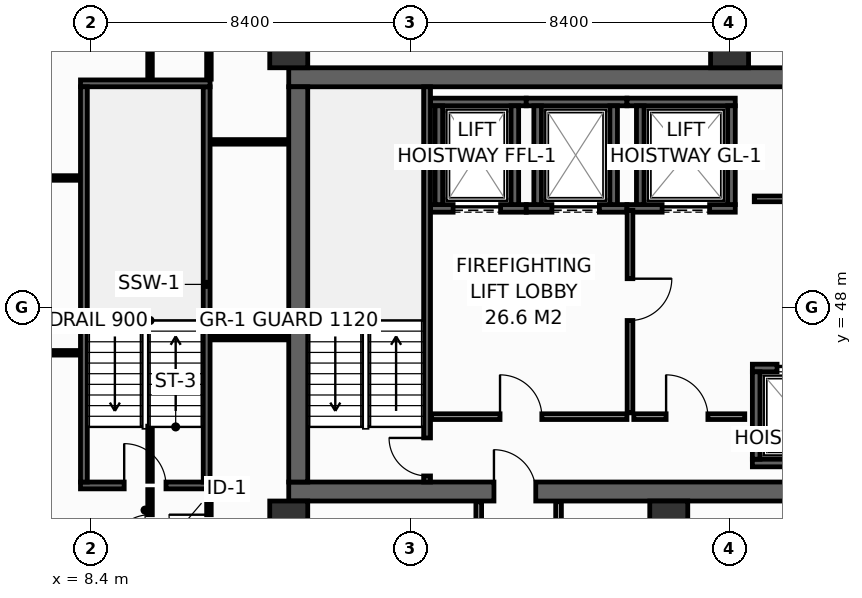
"""IFC4 building model, lengths in metres.
Left out: names, types, materials, properties, quantities, classifications, styles, units other than length and angle.
Written with IfcOpenShell. Run it as: python <this file> out.ifc"""

import sys

from ifc_helpers import new_model, si_unit, direction, frame, frame_2d, origin, origin_2d, place, context, subcontext, project, spatial, rectangle, hollow_rectangle, extrude, element, fill, save


model = new_model("IFC4")
c1 = context("Model", 3, precision=1e-05, world=origin(), true_north=direction((0.0, 1.0)))
c2 = subcontext(c1, "Body", "Model", "MODEL_VIEW")
j1 = project(units=[si_unit("LENGTHUNIT", "METRE"), si_unit("PLANEANGLEUNIT", "RADIAN")], contexts=[c1])
p1 = place(None, origin())
s1 = spatial("IfcSite", under=j1, at=p1, CompositionType="ELEMENT")
p2 = place(p1, origin())
s2 = spatial("IfcBuilding", under=s1, at=p2, CompositionType="ELEMENT")
p3 = place(p2, frame((0.0, 0.0, 129.6)))
s3 = spatial("IfcBuildingStorey", under=s2, at=p3, CompositionType="ELEMENT", Elevation=129.6)
p4 = place(p3, frame((13.6, 43.15, 0.0), z_axis=(0.0, 0.0, 1.0), x_axis=(1.0, 0.0, 0.0)))
e1 = element("IfcWall", 1, at=p4, inside=s3, PredefinedType="SHEAR", context=c2, shape_type="SweptSolid", body=[
    extrude(rectangle(XDim=32.7, YDim=0.5, at=frame_2d((16.35, 0.0))), origin(), (0.0, 0.0, 1.0), 3.55),
])
p5 = place(p4, frame((5.4, 0.0, 0.0)))
e2 = element("IfcOpeningElement", 2, at=p5, cuts=e1, PredefinedType="OPENING", context=c2, shape_type="SweptSolid", body=[
    extrude(rectangle(XDim=1.1, YDim=2.15, at=frame_2d((0.55, 1.075))), frame((0.0, 0.26, 0.0), z_axis=(0.0, -1.0, 0.0), x_axis=(1.0, 0.0, 0.0)), (0.0, 0.0, 1.0), 0.52),
])
p6 = place(p4, frame((25.6, 0.0, 0.0)))
e3 = element("IfcOpeningElement", 3, at=p6, cuts=e1, PredefinedType="OPENING", context=c2, shape_type="SweptSolid", body=[
    extrude(rectangle(XDim=1.1, YDim=2.15, at=frame_2d((0.55, 1.075))), frame((0.0, 0.26, 0.0), z_axis=(0.0, -1.0, 0.0), x_axis=(1.0, 0.0, 0.0)), (0.0, 0.0, 1.0), 0.52),
])
p7 = place(p3, frame((13.6, 54.05, 0.0), z_axis=(0.0, 0.0, 1.0), x_axis=(1.0, 0.0, 0.0)))
e4 = element("IfcWall", 4, at=p7, inside=s3, PredefinedType="SHEAR", context=c2, shape_type="SweptSolid", body=[
    extrude(rectangle(XDim=32.7, YDim=0.5, at=frame_2d((16.35, 0.0))), origin(), (0.0, 0.0, 1.0), 3.55),
])
p8 = place(p3, frame((13.85, 43.4, 0.0), z_axis=(0.0, 0.0, 1.0), x_axis=(0.0, 1.0, 0.0)))
e5 = element("IfcWall", 5, at=p8, inside=s3, PredefinedType="SHEAR", context=c2, shape_type="SweptSolid", body=[
    extrude(rectangle(XDim=10.4, YDim=0.5, at=frame_2d((5.2, 0.0))), origin(), (0.0, 0.0, 1.0), 3.55),
])
for number, where, z_axis, x_axis in (
    (6, (13.6, 54.8, 0.0), (0.0, 0.0, 1.0), (1.0, 0.0, 0.0)),
    (7, (25.2, 54.8, 0.0), (0.0, 0.0, 1.0), (1.0, 0.0, 0.0)),
    (8, (13.6, 42.4, 0.0), (0.0, 0.0, 1.0), (1.0, 0.0, 0.0)),
    (9, (23.6, 42.4, 0.0), (0.0, 0.0, 1.0), (1.0, 0.0, 0.0)),
):
    element("IfcColumn", number, at=place(p3, frame(where, z_axis=z_axis, x_axis=x_axis)), inside=s3, PredefinedType="COLUMN", context=c2, shape_type="SweptSolid", body=[
        extrude(hollow_rectangle(XDim=1.0, YDim=1.0, WallThickness=0.045, at=origin_2d()), origin(), (0.0, 0.0, 1.0), 3.8),
    ])
p9 = place(p3, frame((17.33, 50.6, 0.0), z_axis=(0.0, 0.0, 1.0), x_axis=(1.0, 0.0, 0.0)))
e10 = element("IfcWall", 10, at=p9, inside=s3, PredefinedType="SHEAR", context=c2, shape_type="SweptSolid", body=[
    extrude(rectangle(XDim=2.52, YDim=0.2, at=frame_2d((1.26, 0.0))), origin(), (0.0, 0.0, 1.0), 3.55),
])
p10 = place(p9, frame((0.595, 0.0, 0.0)))
e11 = element("IfcOpeningElement", 11, at=p10, cuts=e10, PredefinedType="OPENING", context=c2, shape_type="SweptSolid", body=[
    extrude(rectangle(XDim=1.25, YDim=2.3, at=frame_2d((0.625, 1.15))), frame((0.0, 0.11, 0.0), z_axis=(0.0, -1.0, 0.0), x_axis=(1.0, 0.0, 0.0)), (0.0, 0.0, 1.0), 0.22),
])
p11 = place(p3, frame((17.33, 53.4, 0.0), z_axis=(0.0, 0.0, 1.0), x_axis=(1.0, 0.0, 0.0)))
e12 = element("IfcWall", 12, at=p11, inside=s3, PredefinedType="SHEAR", context=c2, shape_type="SweptSolid", body=[
    extrude(rectangle(XDim=2.52, YDim=0.2, at=frame_2d((1.26, 0.0))), origin(), (0.0, 0.0, 1.0), 3.55),
])
for number, where, z_axis, x_axis in (
    (13, (17.55, 50.7, 0.0), (0.0, 0.0, 1.0), (0.0, 1.0, 0.0)),
    (14, (19.55, 50.7, 0.0), (0.0, 0.0, 1.0), (0.0, 1.0, 0.0)),
):
    element("IfcWall", number, at=place(p3, frame(where, z_axis=z_axis, x_axis=x_axis)), inside=s3, PredefinedType="SHEAR", context=c2, shape_type="SweptSolid", body=[
        extrude(rectangle(XDim=2.6, YDim=0.2, at=frame_2d((1.3, 0.0))), origin(), (0.0, 0.0, 1.0), 3.55),
    ])
p12 = place(p3, frame((19.85, 50.6, 0.0), z_axis=(0.0, 0.0, 1.0), x_axis=(1.0, 0.0, 0.0)))
e15 = element("IfcWall", 15, at=p12, inside=s3, PredefinedType="SHEAR", context=c2, shape_type="SweptSolid", body=[
    extrude(rectangle(XDim=2.65, YDim=0.2, at=frame_2d((1.325, 0.0))), origin(), (0.0, 0.0, 1.0), 3.55),
])
p13 = place(p12, frame((0.675, 0.0, 0.0)))
e16 = element("IfcOpeningElement", 16, at=p13, cuts=e15, PredefinedType="OPENING", context=c2, shape_type="SweptSolid", body=[
    extrude(rectangle(XDim=1.25, YDim=2.3, at=frame_2d((0.625, 1.15))), frame((0.0, 0.11, 0.0), z_axis=(0.0, -1.0, 0.0), x_axis=(1.0, 0.0, 0.0)), (0.0, 0.0, 1.0), 0.22),
])
p14 = place(p3, frame((19.85, 53.4, 0.0), z_axis=(0.0, 0.0, 1.0), x_axis=(1.0, 0.0, 0.0)))
e17 = element("IfcWall", 17, at=p14, inside=s3, PredefinedType="SHEAR", context=c2, shape_type="SweptSolid", body=[
    extrude(rectangle(XDim=2.65, YDim=0.2, at=frame_2d((1.325, 0.0))), origin(), (0.0, 0.0, 1.0), 3.55),
])
for number, where, z_axis, x_axis in (
    (18, (20.15, 50.7, 0.0), (0.0, 0.0, 1.0), (0.0, 1.0, 0.0)),
    (19, (22.15, 50.7, 0.0), (0.0, 0.0, 1.0), (0.0, 1.0, 0.0)),
):
    element("IfcWall", number, at=place(p3, frame(where, z_axis=z_axis, x_axis=x_axis)), inside=s3, PredefinedType="SHEAR", context=c2, shape_type="SweptSolid", body=[
        extrude(rectangle(XDim=2.6, YDim=0.2, at=frame_2d((1.3, 0.0))), origin(), (0.0, 0.0, 1.0), 3.55),
    ])
p15 = place(p3, frame((22.5, 50.6, 0.0), z_axis=(0.0, 0.0, 1.0), x_axis=(1.0, 0.0, 0.0)))
e20 = element("IfcWall", 20, at=p15, inside=s3, PredefinedType="SHEAR", context=c2, shape_type="SweptSolid", body=[
    extrude(rectangle(XDim=2.85, YDim=0.2, at=frame_2d((1.425, 0.0))), origin(), (0.0, 0.0, 1.0), 3.55),
])
p16 = place(p15, frame((0.925, 0.0, 0.0)))
e21 = element("IfcOpeningElement", 21, at=p16, cuts=e20, PredefinedType="OPENING", context=c2, shape_type="SweptSolid", body=[
    extrude(rectangle(XDim=1.25, YDim=2.3, at=frame_2d((0.625, 1.15))), frame((0.0, 0.11, 0.0), z_axis=(0.0, -1.0, 0.0), x_axis=(1.0, 0.0, 0.0)), (0.0, 0.0, 1.0), 0.22),
])
p17 = place(p3, frame((22.5, 53.4, 0.0), z_axis=(0.0, 0.0, 1.0), x_axis=(1.0, 0.0, 0.0)))
e22 = element("IfcWall", 22, at=p17, inside=s3, PredefinedType="SHEAR", context=c2, shape_type="SweptSolid", body=[
    extrude(rectangle(XDim=2.85, YDim=0.2, at=frame_2d((1.425, 0.0))), origin(), (0.0, 0.0, 1.0), 3.55),
])
for number, where, z_axis, x_axis in (
    (23, (22.85, 50.7, 0.0), (0.0, 0.0, 1.0), (0.0, 1.0, 0.0)),
    (24, (25.25, 50.7, 0.0), (0.0, 0.0, 1.0), (0.0, 1.0, 0.0)),
):
    element("IfcWall", number, at=place(p3, frame(where, z_axis=z_axis, x_axis=x_axis)), inside=s3, PredefinedType="SHEAR", context=c2, shape_type="SweptSolid", body=[
        extrude(rectangle(XDim=2.6, YDim=0.2, at=frame_2d((1.3, 0.0))), origin(), (0.0, 0.0, 1.0), 3.55),
    ])
p18 = place(p3, frame((25.8, 43.9, 0.0), z_axis=(0.0, 0.0, 1.0), x_axis=(1.0, 0.0, 0.0)))
e25 = element("IfcWall", 25, at=p18, inside=s3, PredefinedType="SHEAR", context=c2, shape_type="SweptSolid", body=[
    extrude(rectangle(XDim=2.575, YDim=0.2, at=frame_2d((1.288, 0.0))), origin(), (0.0, 0.0, 1.0), 3.55),
])
p19 = place(p3, frame((25.8, 46.4, 0.0), z_axis=(0.0, 0.0, 1.0), x_axis=(1.0, 0.0, 0.0)))
e26 = element("IfcWall", 26, at=p19, inside=s3, PredefinedType="SHEAR", context=c2, shape_type="SweptSolid", body=[
    extrude(rectangle(XDim=2.575, YDim=0.2, at=frame_2d((1.288, 0.0))), origin(), (0.0, 0.0, 1.0), 3.55),
])
p20 = place(p19, frame((0.65, 0.0, 0.0)))
e27 = element("IfcOpeningElement", 27, at=p20, cuts=e26, PredefinedType="OPENING", context=c2, shape_type="SweptSolid", body=[
    extrude(rectangle(XDim=1.1, YDim=2.2, at=frame_2d((0.55, 1.1))), frame((0.0, 0.11, 0.0), z_axis=(0.0, -1.0, 0.0), x_axis=(1.0, 0.0, 0.0)), (0.0, 0.0, 1.0), 0.22),
])
p21 = place(p3, frame((25.9, 44.0, 0.0), z_axis=(0.0, 0.0, 1.0), x_axis=(0.0, 1.0, 0.0)))
e28 = element("IfcWall", 28, at=p21, inside=s3, PredefinedType="SHEAR", context=c2, shape_type="SweptSolid", body=[
    extrude(rectangle(XDim=2.3, YDim=0.2, at=frame_2d((1.15, 0.0))), origin(), (0.0, 0.0, 1.0), 3.55),
])
p22 = place(p3, frame((17.24, 43.4, 0.0), z_axis=(0.0, 0.0, 1.0), x_axis=(0.0, 1.0, 0.0)))
e29 = element("IfcWall", 29, at=p22, inside=s3, PredefinedType="SHEAR", context=c2, shape_type="SweptSolid", body=[
    extrude(rectangle(XDim=10.4, YDim=0.18, at=frame_2d((5.2, 0.0))), origin(), (0.0, 0.0, 1.0), 3.55),
])
p23 = place(p22, frame((0.16, 0.0, 0.0)))
e30 = element("IfcOpeningElement", 30, at=p23, cuts=e29, PredefinedType="OPENING", context=c2, shape_type="SweptSolid", body=[
    extrude(rectangle(XDim=1.0, YDim=2.15, at=frame_2d((0.5, 1.075))), frame((0.0, 0.1, 0.0), z_axis=(0.0, -1.0, 0.0), x_axis=(1.0, 0.0, 0.0)), (0.0, 0.0, 1.0), 0.2),
])
p24 = place(p3, frame((8.12, 43.31, 0.0), z_axis=(0.0, 0.0, 1.0), x_axis=(1.0, 0.0, 0.0)))
e31 = element("IfcWall", 31, at=p24, inside=s3, PredefinedType="SHEAR", context=c2, shape_type="SweptSolid", body=[
    extrude(rectangle(XDim=3.41, YDim=0.18, at=frame_2d((1.705, 0.0))), origin(), (0.0, 0.0, 1.0), 3.55),
])
p25 = place(p24, frame((1.15, 0.0, 0.0)))
e32 = element("IfcOpeningElement", 32, at=p25, cuts=e31, PredefinedType="OPENING", context=c2, shape_type="SweptSolid", body=[
    extrude(rectangle(XDim=1.1, YDim=2.15, at=frame_2d((0.55, 1.075))), frame((0.0, 0.1, 0.0), z_axis=(0.0, -1.0, 0.0), x_axis=(1.0, 0.0, 0.0)), (0.0, 0.0, 1.0), 0.2),
])
p26 = place(p3, frame((11.44, 43.4, 0.0), z_axis=(0.0, 0.0, 1.0), x_axis=(0.0, 1.0, 0.0)))
e33 = element("IfcWall", 33, at=p26, inside=s3, PredefinedType="SHEAR", context=c2, shape_type="SweptSolid", body=[
    extrude(rectangle(XDim=10.4, YDim=0.18, at=frame_2d((5.2, 0.0))), origin(), (0.0, 0.0, 1.0), 3.55),
])
p27 = place(p3, frame((11.53, 53.89, 0.0), z_axis=(0.0, 0.0, 1.0), x_axis=(-1.0, 0.0, 0.0)))
e34 = element("IfcWall", 34, at=p27, inside=s3, PredefinedType="SHEAR", context=c2, shape_type="SweptSolid", body=[
    extrude(rectangle(XDim=3.41, YDim=0.18, at=frame_2d((1.705, 0.0))), origin(), (0.0, 0.0, 1.0), 3.55),
])
p28 = place(p3, frame((8.21, 53.8, 0.0), z_axis=(0.0, 0.0, 1.0), x_axis=(0.0, -1.0, 0.0)))
e35 = element("IfcWall", 35, at=p28, inside=s3, PredefinedType="SHEAR", context=c2, shape_type="SweptSolid", body=[
    extrude(rectangle(XDim=10.4, YDim=0.18, at=frame_2d((5.2, 0.0))), origin(), (0.0, 0.0, 1.0), 3.55),
])
p29 = place(p3, frame((17.36, 45.12, 0.0), z_axis=(0.0, 0.0, 1.0), x_axis=(1.0, 0.0, 0.0)))
e36 = element("IfcWall", 36, at=p29, inside=s3, PredefinedType="PARTITIONING", context=c2, shape_type="SweptSolid", body=[
    extrude(rectangle(XDim=5.14, YDim=0.15, at=frame_2d((2.57, 0.0))), origin(), (0.0, 0.0, 1.0), 3.55),
])
p30 = place(p29, frame((1.8, 0.0, 0.0)))
e37 = element("IfcOpeningElement", 37, at=p30, cuts=e36, PredefinedType="OPENING", context=c2, shape_type="SweptSolid", body=[
    extrude(rectangle(XDim=1.1, YDim=2.15, at=frame_2d((0.55, 1.075))), frame((0.0, 0.085, 0.0), z_axis=(0.0, -1.0, 0.0), x_axis=(1.0, 0.0, 0.0)), (0.0, 0.0, 1.0), 0.17),
])
p31 = place(p3, frame((22.58, 50.55, 0.0), z_axis=(0.0, 0.0, 1.0), x_axis=(0.0, -1.0, 0.0)))
e38 = element("IfcWall", 38, at=p31, inside=s3, PredefinedType="PARTITIONING", context=c2, shape_type="SweptSolid", body=[
    extrude(rectangle(XDim=5.33, YDim=0.15, at=frame_2d((2.665, 0.0))), origin(), (0.0, 0.0, 1.0), 3.55),
])
p32 = place(p31, frame((1.8, 0.0, 0.0)))
e39 = element("IfcOpeningElement", 39, at=p32, cuts=e38, PredefinedType="OPENING", context=c2, shape_type="SweptSolid", body=[
    extrude(rectangle(XDim=1.1, YDim=2.15, at=frame_2d((0.55, 1.075))), frame((0.0, 0.085, 0.0), z_axis=(0.0, -1.0, 0.0), x_axis=(1.0, 0.0, 0.0)), (0.0, 0.0, 1.0), 0.17),
])
p33 = place(p3, frame((22.68, 45.12, 0.0), z_axis=(0.0, 0.0, 1.0), x_axis=(1.0, 0.0, 0.0)))
e40 = element("IfcWall", 40, at=p33, inside=s3, PredefinedType="PARTITIONING", context=c2, shape_type="SweptSolid", body=[
    extrude(rectangle(XDim=2.92, YDim=0.15, at=frame_2d((1.46, 0.0))), origin(), (0.0, 0.0, 1.0), 3.55),
])
p34 = place(p33, frame((0.85, 0.0, 0.0)))
e41 = element("IfcOpeningElement", 41, at=p34, cuts=e40, PredefinedType="OPENING", context=c2, shape_type="SweptSolid", body=[
    extrude(rectangle(XDim=1.1, YDim=2.15, at=frame_2d((0.55, 1.075))), frame((0.0, 0.085, 0.0), z_axis=(0.0, -1.0, 0.0), x_axis=(1.0, 0.0, 0.0)), (0.0, 0.0, 1.0), 0.17),
])
p35 = place(p3, frame((25.85, 50.85, 0.0), z_axis=(0.0, 0.0, 1.0), x_axis=(1.0, 0.0, 0.0)))
e42 = element("IfcWall", 42, at=p35, inside=s3, PredefinedType="PARTITIONING", context=c2, shape_type="SweptSolid", body=[
    extrude(rectangle(XDim=7.65, YDim=0.15, at=frame_2d((3.825, 0.0))), origin(), (0.0, 0.0, 1.0), 3.55),
])
p36 = place(p35, frame((1.25, 0.0, 0.0)))
e43 = element("IfcOpeningElement", 43, at=p36, cuts=e42, PredefinedType="OPENING", context=c2, shape_type="SweptSolid", body=[
    extrude(rectangle(XDim=0.95, YDim=2.15, at=frame_2d((0.475, 1.075))), frame((0.0, 0.085, 0.0), z_axis=(0.0, -1.0, 0.0), x_axis=(1.0, 0.0, 0.0)), (0.0, 0.0, 1.0), 0.17),
])
p37 = place(p3, frame((11.55, 52.35, 0.0), z_axis=(0.0, 0.0, 1.0), x_axis=(1.0, 0.0, 0.0)))
e44 = element("IfcWall", 44, at=p37, inside=s3, PredefinedType="PARTITIONING", context=c2, shape_type="SweptSolid", body=[
    extrude(rectangle(XDim=2.03, YDim=0.12, at=frame_2d((1.015, 0.0))), origin(), (0.0, 0.0, 1.0), 3.55),
])
p38 = place(p3, frame((11.5, 54.0, 0.0), z_axis=(0.0, 0.0, 1.0), x_axis=(0.0, 1.0, 0.0)))
e45 = element("IfcWall", 45, at=p38, inside=s3, PredefinedType="PARTITIONING", context=c2, shape_type="SweptSolid", body=[
    extrude(rectangle(XDim=1.995, YDim=0.12, at=frame_2d((0.998, 0.0))), origin(), (0.0, 0.0, 1.0), 2.935),
])
p39 = place(p3, frame((5.003, 46.8, 0.0), z_axis=(0.0, 0.0, 1.0), x_axis=(1.0, 0.0, 0.0)))
e46 = element("IfcWall", 46, at=p39, inside=s3, PredefinedType="PARTITIONING", context=c2, shape_type="SweptSolid", body=[
    extrude(rectangle(XDim=3.097, YDim=0.12, at=frame_2d((1.549, 0.0))), origin(), (0.0, 0.0, 1.0), 2.835),
])
p40 = place(p3, frame((4.238, 51.4, 0.0), z_axis=(0.0, 0.0, 1.0), x_axis=(1.0, 0.0, 0.0)))
e47 = element("IfcWall", 47, at=p40, inside=s3, PredefinedType="PARTITIONING", context=c2, shape_type="SweptSolid", body=[
    extrude(rectangle(XDim=3.862, YDim=0.12, at=frame_2d((1.931, 0.0))), origin(), (0.0, 0.0, 1.0), 2.835),
])
p41 = place(p3, frame((9.95, 40.83, 0.0), z_axis=(0.0, 0.0, 1.0), x_axis=(0.0, 1.0, 0.0)))
e48 = element("IfcWall", 48, at=p41, inside=s3, PredefinedType="PARTITIONING", context=c2, shape_type="SweptSolid", body=[
    extrude(rectangle(XDim=2.37, YDim=0.12, at=frame_2d((1.185, 0.0))), origin(), (0.0, 0.0, 1.0), 2.835),
])
p42 = place(p41, frame((0.66, 0.0, 0.0)))
e49 = element("IfcOpeningElement", 49, at=p42, cuts=e48, PredefinedType="OPENING", context=c2, shape_type="SweptSolid", body=[
    extrude(rectangle(XDim=1.05, YDim=2.15, at=frame_2d((0.525, 1.075))), frame((0.0, 0.07, 0.0), z_axis=(0.0, -1.0, 0.0), x_axis=(1.0, 0.0, 0.0)), (0.0, 0.0, 1.0), 0.14),
])
p43 = place(p3, frame((9.95, 43.42, 0.0), z_axis=(0.0, 0.0, 1.0), x_axis=(0.0, 1.0, 0.0)))
e50 = element("IfcWall", 50, at=p43, inside=s3, PredefinedType="PARTITIONING", context=c2, shape_type="SweptSolid", body=[
    extrude(rectangle(XDim=1.45, YDim=0.12, at=frame_2d((0.725, 0.0))), origin(), (0.0, 0.0, 1.0), 3.55),
])
p44 = place(p3, frame((9.95, 54.0, 0.0), z_axis=(0.0, 0.0, 1.0), x_axis=(0.0, 1.0, 0.0)))
e51 = element("IfcWall", 51, at=p44, inside=s3, PredefinedType="PARTITIONING", context=c2, shape_type="SweptSolid", body=[
    extrude(rectangle(XDim=1.995, YDim=0.12, at=frame_2d((0.998, 0.0))), origin(), (0.0, 0.0, 1.0), 2.935),
])
p45 = place(p3, frame((11.55, 47.2, 0.0), z_axis=(0.0, 0.0, 1.0), x_axis=(1.0, 0.0, 0.0)))
e52 = element("IfcWall", 52, at=p45, inside=s3, PredefinedType="PARTITIONING", context=c2, shape_type="SweptSolid", body=[
    extrude(rectangle(XDim=2.03, YDim=0.12, at=frame_2d((1.015, 0.0))), origin(), (0.0, 0.0, 1.0), 3.55),
])
p46 = place(p3, frame((11.5, 40.83, 0.0), z_axis=(0.0, 0.0, 1.0), x_axis=(0.0, 1.0, 0.0)))
e53 = element("IfcWall", 53, at=p46, inside=s3, PredefinedType="PARTITIONING", context=c2, shape_type="SweptSolid", body=[
    extrude(rectangle(XDim=2.37, YDim=0.12, at=frame_2d((1.185, 0.0))), origin(), (0.0, 0.0, 1.0), 2.835),
])
p47 = place(p46, frame((0.66, 0.0, 0.0)))
e54 = element("IfcOpeningElement", 54, at=p47, cuts=e53, PredefinedType="OPENING", context=c2, shape_type="SweptSolid", body=[
    extrude(rectangle(XDim=1.05, YDim=2.15, at=frame_2d((0.525, 1.075))), frame((0.0, 0.07, 0.0), z_axis=(0.0, -1.0, 0.0), x_axis=(1.0, 0.0, 0.0)), (0.0, 0.0, 1.0), 0.14),
])
p48 = place(p3, frame((13.8, 40.83, 0.0), z_axis=(0.0, 0.0, 1.0), x_axis=(0.0, 1.0, 0.0)))
e55 = element("IfcWall", 55, at=p48, inside=s3, PredefinedType="PARTITIONING", context=c2, shape_type="SweptSolid", body=[
    extrude(rectangle(XDim=2.05, YDim=0.15, at=frame_2d((1.025, 0.0))), origin(), (0.0, 0.0, 1.0), 3.55),
])
for number, where, z_axis, x_axis in (
    (56, (18.6, 40.75, 0.0), (0.0, 0.0, 1.0), (0.0, 1.0, 0.0)),
    (57, (20.7, 40.75, 0.0), (0.0, 0.0, 1.0), (0.0, 1.0, 0.0)),
):
    element("IfcWall", number, at=place(p3, frame(where, z_axis=z_axis, x_axis=x_axis)), inside=s3, PredefinedType="PARTITIONING", context=c2, shape_type="SweptSolid", body=[
        extrude(rectangle(XDim=2.13, YDim=0.15, at=frame_2d((1.065, 0.0))), origin(), (0.0, 0.0, 1.0), 3.55),
    ])
p49 = place(p10, origin())
e58 = element("IfcDoor", 58, at=p49, inside=s3, OperationType="SLIDING_TO_LEFT", PredefinedType="DOOR", context=c2, shape_type="SweptSolid", body=[
    extrude(rectangle(XDim=1.25, YDim=2.3, at=frame_2d((0.625, 1.15))), frame((0.0, 0.025, 0.0), z_axis=(0.0, -1.0, 0.0), x_axis=(1.0, 0.0, 0.0)), (0.0, 0.0, 1.0), 0.05),
])
fill(e11, e58)
p50 = place(p13, origin())
e59 = element("IfcDoor", 59, at=p50, inside=s3, OperationType="SLIDING_TO_LEFT", PredefinedType="DOOR", context=c2, shape_type="SweptSolid", body=[
    extrude(rectangle(XDim=1.25, YDim=2.3, at=frame_2d((0.625, 1.15))), frame((0.0, 0.025, 0.0), z_axis=(0.0, -1.0, 0.0), x_axis=(1.0, 0.0, 0.0)), (0.0, 0.0, 1.0), 0.05),
])
fill(e16, e59)
p51 = place(p16, origin())
e60 = element("IfcDoor", 60, at=p51, inside=s3, OperationType="SLIDING_TO_LEFT", PredefinedType="DOOR", context=c2, shape_type="SweptSolid", body=[
    extrude(rectangle(XDim=1.25, YDim=2.3, at=frame_2d((0.625, 1.15))), frame((0.0, 0.025, 0.0), z_axis=(0.0, -1.0, 0.0), x_axis=(1.0, 0.0, 0.0)), (0.0, 0.0, 1.0), 0.05),
])
fill(e21, e60)
p52 = place(p20, origin())
e61 = element("IfcDoor", 61, at=p52, inside=s3, OperationType="SLIDING_TO_LEFT", PredefinedType="DOOR", context=c2, shape_type="SweptSolid", body=[
    extrude(rectangle(XDim=1.1, YDim=2.2, at=frame_2d((0.55, 1.1))), frame((0.0, 0.025, 0.0), z_axis=(0.0, -1.0, 0.0), x_axis=(1.0, 0.0, 0.0)), (0.0, 0.0, 1.0), 0.05),
])
fill(e27, e61)
p53 = place(p23, origin())
e62 = element("IfcDoor", 62, at=p53, inside=s3, OperationType="SINGLE_SWING_RIGHT", PredefinedType="DOOR", context=c2, shape_type="SweptSolid", body=[
    extrude(rectangle(XDim=1.0, YDim=2.15, at=frame_2d((0.5, 1.075))), frame((0.0, 0.025, 0.0), z_axis=(0.0, -1.0, 0.0), x_axis=(1.0, 0.0, 0.0)), (0.0, 0.0, 1.0), 0.05),
])
fill(e30, e62)
p54 = place(p25, origin())
e63 = element("IfcDoor", 63, at=p54, inside=s3, OperationType="SINGLE_SWING_LEFT", PredefinedType="DOOR", context=c2, shape_type="SweptSolid", body=[
    extrude(rectangle(XDim=1.1, YDim=2.15, at=frame_2d((0.55, 1.075))), frame((0.0, 0.025, 0.0), z_axis=(0.0, -1.0, 0.0), x_axis=(1.0, 0.0, 0.0)), (0.0, 0.0, 1.0), 0.05),
])
fill(e32, e63)
p55 = place(p30, origin())
e64 = element("IfcDoor", 64, at=p55, inside=s3, OperationType="SINGLE_SWING_LEFT", PredefinedType="DOOR", context=c2, shape_type="SweptSolid", body=[
    extrude(rectangle(XDim=1.1, YDim=2.15, at=frame_2d((0.55, 1.075))), frame((0.0, 0.025, 0.0), z_axis=(0.0, -1.0, 0.0), x_axis=(1.0, 0.0, 0.0)), (0.0, 0.0, 1.0), 0.05),
])
fill(e37, e64)
p56 = place(p32, origin())
e65 = element("IfcDoor", 65, at=p56, inside=s3, OperationType="SINGLE_SWING_LEFT", PredefinedType="DOOR", context=c2, shape_type="SweptSolid", body=[
    extrude(rectangle(XDim=1.1, YDim=2.15, at=frame_2d((0.55, 1.075))), frame((0.0, 0.025, 0.0), z_axis=(0.0, -1.0, 0.0), x_axis=(1.0, 0.0, 0.0)), (0.0, 0.0, 1.0), 0.05),
])
fill(e39, e65)
p57 = place(p34, origin())
e66 = element("IfcDoor", 66, at=p57, inside=s3, OperationType="SINGLE_SWING_LEFT", PredefinedType="DOOR", context=c2, shape_type="SweptSolid", body=[
    extrude(rectangle(XDim=1.1, YDim=2.15, at=frame_2d((0.55, 1.075))), frame((0.0, 0.025, 0.0), z_axis=(0.0, -1.0, 0.0), x_axis=(1.0, 0.0, 0.0)), (0.0, 0.0, 1.0), 0.05),
])
fill(e41, e66)
p58 = place(p5, origin())
e67 = element("IfcDoor", 67, at=p58, inside=s3, OperationType="SINGLE_SWING_LEFT", PredefinedType="DOOR", context=c2, shape_type="SweptSolid", body=[
    extrude(rectangle(XDim=1.1, YDim=2.15, at=frame_2d((0.55, 1.075))), frame((0.0, 0.025, 0.0), z_axis=(0.0, -1.0, 0.0), x_axis=(1.0, 0.0, 0.0)), (0.0, 0.0, 1.0), 0.05),
])
fill(e2, e67)
p59 = place(p42, origin())
e68 = element("IfcDoor", 68, at=p59, inside=s3, OperationType="SINGLE_SWING_LEFT", PredefinedType="DOOR", context=c2, shape_type="SweptSolid", body=[
    extrude(rectangle(XDim=1.05, YDim=2.15, at=frame_2d((0.525, 1.075))), frame((0.0, 0.025, 0.0), z_axis=(0.0, -1.0, 0.0), x_axis=(1.0, 0.0, 0.0)), (0.0, 0.0, 1.0), 0.05),
])
fill(e49, e68)
p60 = place(p47, origin())
e69 = element("IfcDoor", 69, at=p60, inside=s3, OperationType="SINGLE_SWING_RIGHT", PredefinedType="DOOR", context=c2, shape_type="SweptSolid", body=[
    extrude(rectangle(XDim=1.05, YDim=2.15, at=frame_2d((0.525, 1.075))), frame((0.0, 0.025, 0.0), z_axis=(0.0, -1.0, 0.0), x_axis=(1.0, 0.0, 0.0)), (0.0, 0.0, 1.0), 0.05),
])
fill(e54, e69)
save(model, sys.argv[1])
